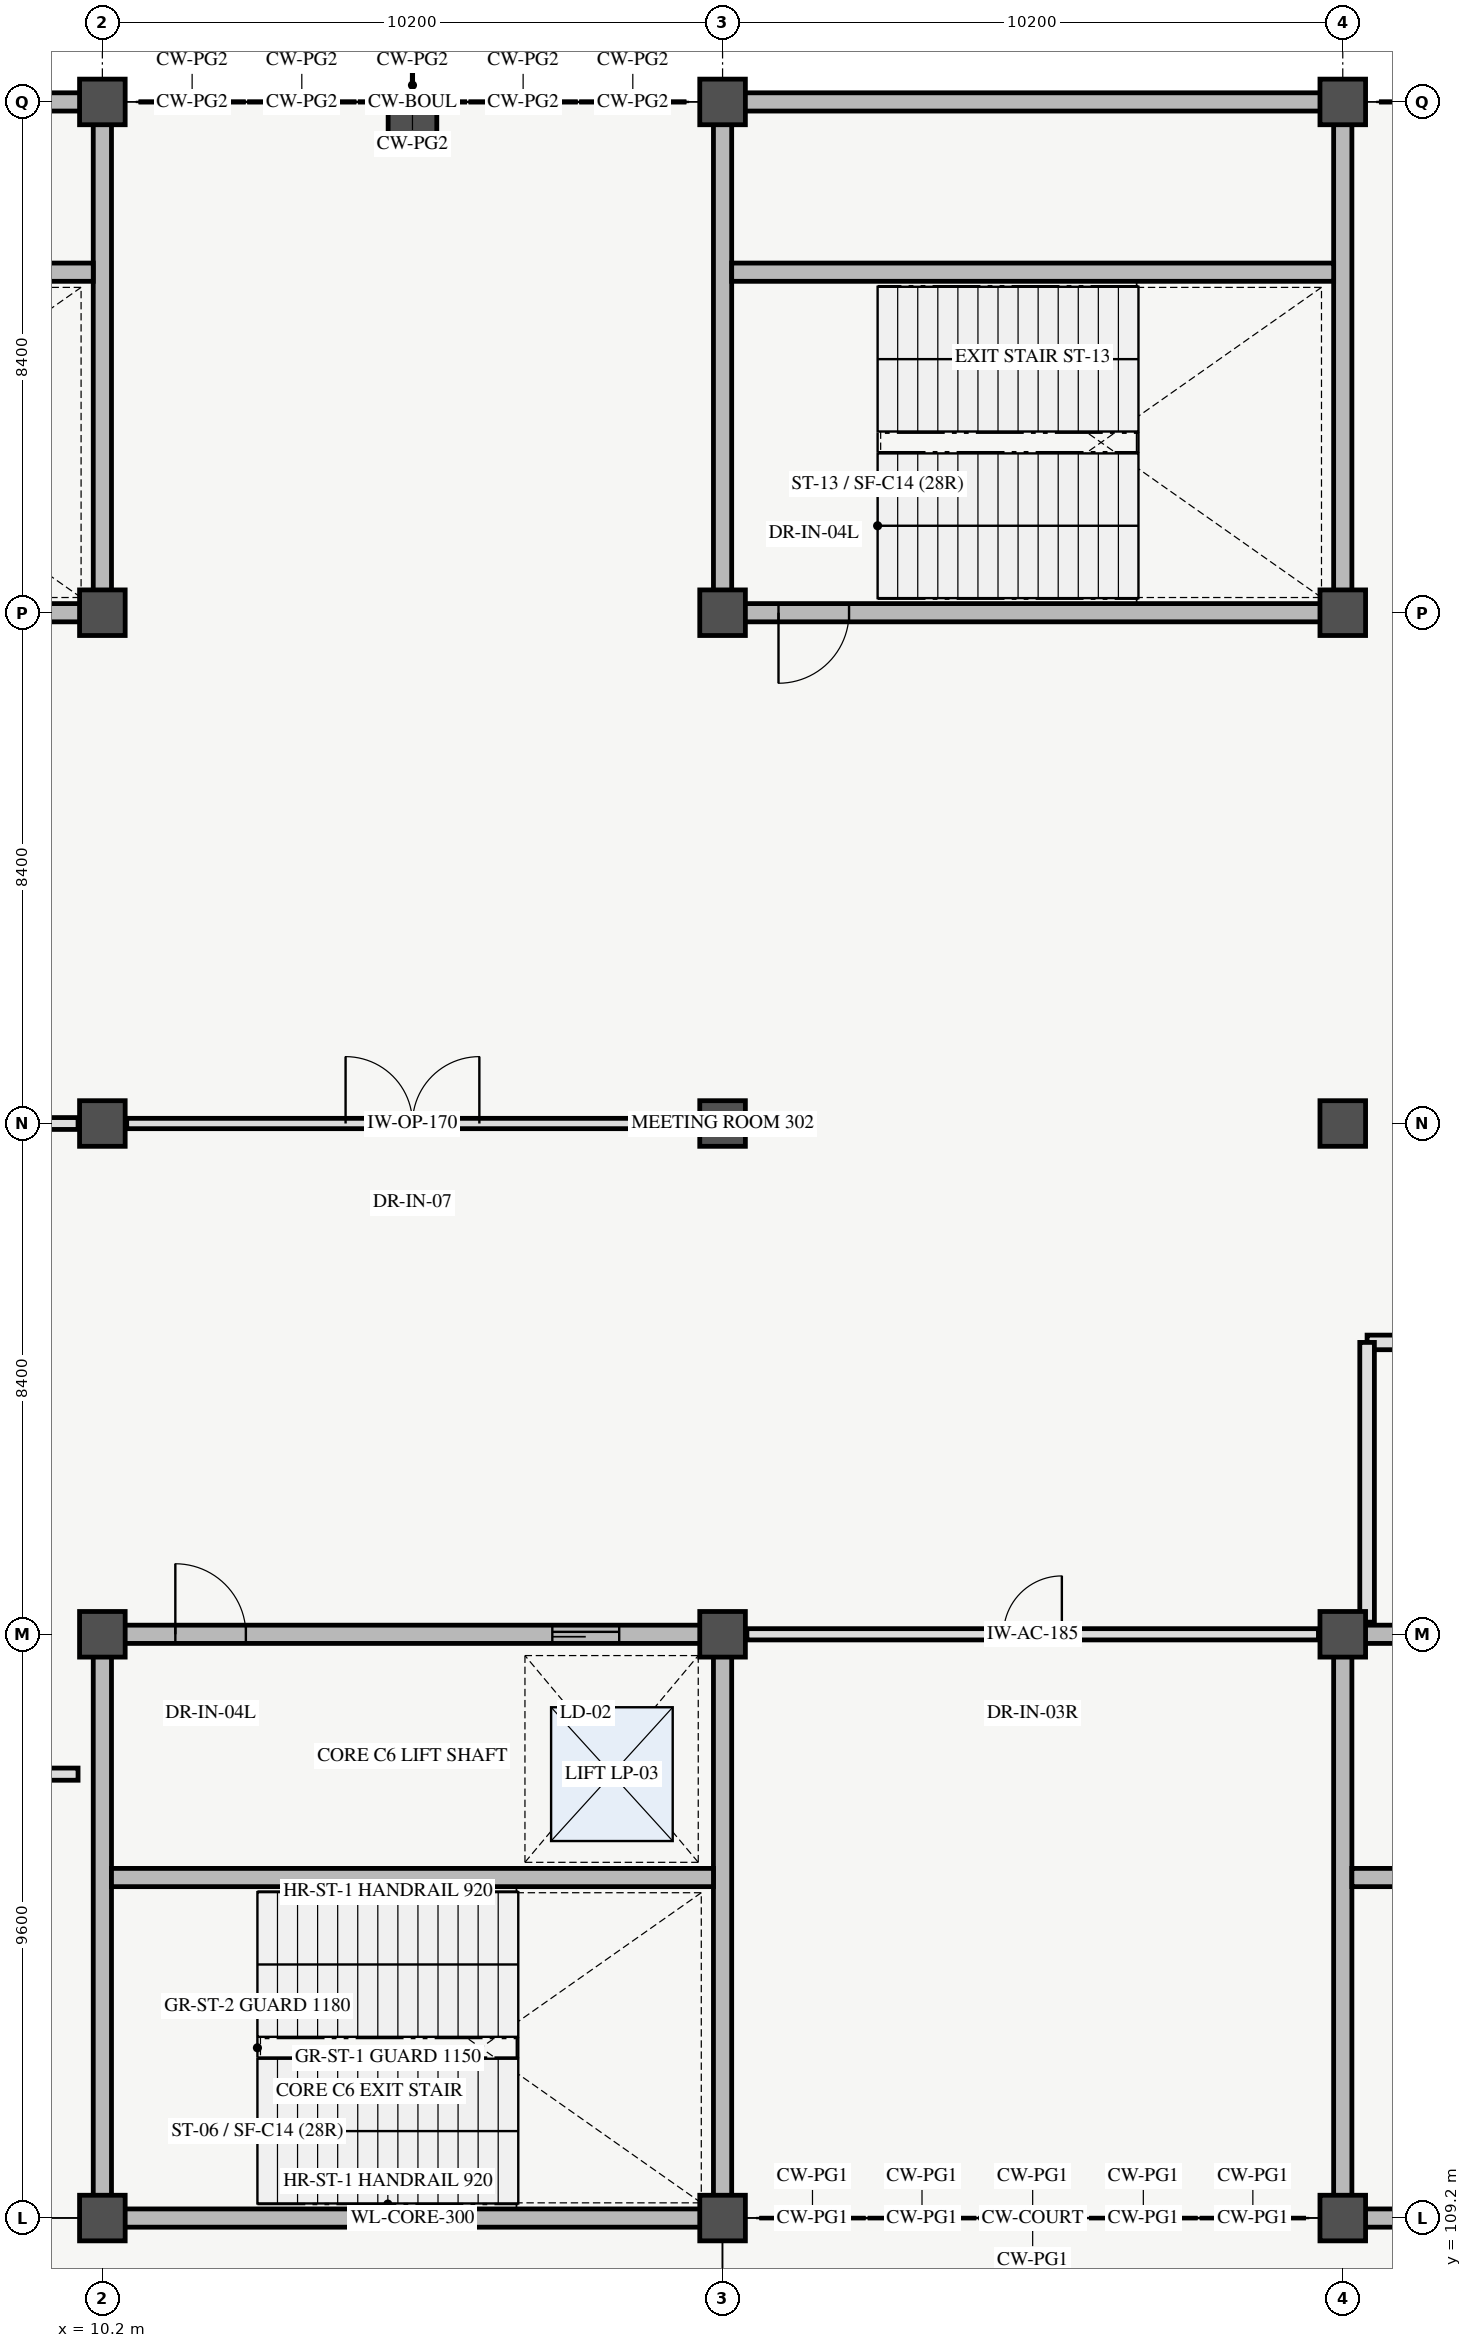
"""IFC4 building model, lengths in metres.
Left out: names, types, materials, properties, quantities, classifications, styles, units other than length and angle.
Written with IfcOpenShell. Run it as: python <this file> out.ifc"""

import sys

from ifc_helpers import new_model, si_unit, direction, frame, frame_2d, origin, origin_2d, place, context, subcontext, project, spatial, rectangle, extrude, element, fill, save


model = new_model("IFC4")
c1 = context("Model", 3, precision=1e-05, world=origin(), true_north=direction((0.0, 1.0)))
c2 = subcontext(c1, "Body", "Model", "MODEL_VIEW")
j1 = project(units=[si_unit("LENGTHUNIT", "METRE"), si_unit("PLANEANGLEUNIT", "RADIAN")], contexts=[c1])
p1 = place(None, origin())
s1 = spatial("IfcSite", under=j1, at=p1, CompositionType="ELEMENT")
p2 = place(p1, origin())
s2 = spatial("IfcBuilding", under=s1, at=p2, CompositionType="ELEMENT")
p3 = place(p2, frame((0.0, 0.0, 10.8)))
s3 = spatial("IfcBuildingStorey", under=s2, at=p3, CompositionType="ELEMENT", Elevation=10.8)
for number, where, z_axis, x_axis in (
    (1, (10.2, 109.2, 0.0), (0.0, 0.0, 1.0), (1.0, 0.0, 0.0)),
    (2, (10.2, 118.8, 0.0), (0.0, 0.0, 1.0), (1.0, 0.0, 0.0)),
    (3, (10.2, 127.2, 0.0), (0.0, 0.0, 1.0), (1.0, 0.0, 0.0)),
    (4, (10.2, 135.6, 0.0), (0.0, 0.0, 1.0), (1.0, 0.0, 0.0)),
    (5, (10.2, 144.0, 0.0), (0.0, 0.0, 1.0), (1.0, 0.0, 0.0)),
    (6, (20.4, 109.2, 0.0), (0.0, 0.0, 1.0), (1.0, 0.0, 0.0)),
    (7, (20.4, 118.8, 0.0), (0.0, 0.0, 1.0), (1.0, 0.0, 0.0)),
    (8, (20.4, 127.2, 0.0), (0.0, 0.0, 1.0), (1.0, 0.0, 0.0)),
    (9, (20.4, 135.6, 0.0), (0.0, 0.0, 1.0), (1.0, 0.0, 0.0)),
    (10, (20.4, 144.0, 0.0), (0.0, 0.0, 1.0), (1.0, 0.0, 0.0)),
    (11, (30.6, 109.2, 0.0), (0.0, 0.0, 1.0), (1.0, 0.0, 0.0)),
    (12, (30.6, 118.8, 0.0), (0.0, 0.0, 1.0), (1.0, 0.0, 0.0)),
    (13, (30.6, 127.2, 0.0), (0.0, 0.0, 1.0), (1.0, 0.0, 0.0)),
    (14, (30.6, 135.6, 0.0), (0.0, 0.0, 1.0), (1.0, 0.0, 0.0)),
    (15, (30.6, 144.0, 0.0), (0.0, 0.0, 1.0), (1.0, 0.0, 0.0)),
):
    element("IfcColumn", number, at=place(p3, frame(where, z_axis=z_axis, x_axis=x_axis)), inside=s3, PredefinedType="COLUMN", context=c2, shape_type="SweptSolid", body=[
        extrude(rectangle(XDim=0.75, YDim=0.75, at=origin_2d()), origin(), (0.0, 0.0, 1.0), 4.2),
    ])
p4 = place(p3, frame((15.3, 143.7, 0.0), z_axis=(0.0, 0.0, 1.0), x_axis=(1.0, 0.0, 0.0)))
e16 = element("IfcColumn", 16, at=p4, inside=s3, PredefinedType="PILASTER", context=c2, shape_type="SweptSolid", body=[
    extrude(rectangle(XDim=0.8, YDim=0.5, at=origin_2d()), origin(), (0.0, 0.0, 1.0), 4.2),
])
p5 = place(p3, frame((10.2, 109.2, 0.0), z_axis=(0.0, 0.0, 1.0), x_axis=(1.0, 0.0, 0.0)))
e17 = element("IfcWall", 17, at=p5, inside=s3, PredefinedType="SHEAR", context=c2, shape_type="SweptSolid", body=[
    extrude(rectangle(XDim=10.2, YDim=0.3, at=frame_2d((5.1, 0.0))), origin(), (0.0, 0.0, 1.0), 4.2),
])
p6 = place(p3, frame((10.2, 118.8, 0.0), z_axis=(0.0, 0.0, 1.0), x_axis=(1.0, 0.0, 0.0)))
e18 = element("IfcWall", 18, at=p6, inside=s3, PredefinedType="SHEAR", context=c2, shape_type="SweptSolid", body=[
    extrude(rectangle(XDim=10.2, YDim=0.3, at=frame_2d((5.1, 0.0))), origin(), (0.0, 0.0, 1.0), 4.2),
])
p7 = place(p6, frame((1.2, 0.0, 0.0)))
e19 = element("IfcOpeningElement", 19, at=p7, cuts=e18, PredefinedType="OPENING", context=c2, shape_type="SweptSolid", body=[
    extrude(rectangle(XDim=1.16, YDim=2.2, at=frame_2d((0.58, 1.1))), frame((0.0, 0.16, 0.0), z_axis=(0.0, -1.0, 0.0), x_axis=(1.0, 0.0, 0.0)), (0.0, 0.0, 1.0), 0.32),
])
p8 = place(p6, frame((7.4, 0.0, 0.0)))
e20 = element("IfcOpeningElement", 20, at=p8, cuts=e18, PredefinedType="OPENING", context=c2, shape_type="SweptSolid", body=[
    extrude(rectangle(XDim=1.1, YDim=2.2, at=frame_2d((0.55, 1.1))), frame((0.0, 0.16, 0.0), z_axis=(0.0, -1.0, 0.0), x_axis=(1.0, 0.0, 0.0)), (0.0, 0.0, 1.0), 0.32),
])
for number, where, z_axis, x_axis in (
    (21, (10.2, 109.2, 0.0), (0.0, 0.0, 1.0), (0.0, 1.0, 0.0)),
    (22, (20.4, 109.2, 0.0), (0.0, 0.0, 1.0), (0.0, 1.0, 0.0)),
):
    element("IfcWall", number, at=place(p3, frame(where, z_axis=z_axis, x_axis=x_axis)), inside=s3, PredefinedType="SHEAR", context=c2, shape_type="SweptSolid", body=[
        extrude(rectangle(XDim=9.6, YDim=0.3, at=frame_2d((4.8, 0.0))), origin(), (0.0, 0.0, 1.0), 4.2),
    ])
p9 = place(p3, frame((30.6, 109.2, 0.0), z_axis=(0.0, 0.0, 1.0), x_axis=(1.0, 0.0, 0.0)))
e23 = element("IfcWall", 23, at=p9, inside=s3, PredefinedType="SHEAR", context=c2, shape_type="SweptSolid", body=[
    extrude(rectangle(XDim=10.2, YDim=0.3, at=frame_2d((5.1, 0.0))), origin(), (0.0, 0.0, 1.0), 4.2),
])
p10 = place(p3, frame((30.6, 118.8, 0.0), z_axis=(0.0, 0.0, 1.0), x_axis=(1.0, 0.0, 0.0)))
e24 = element("IfcWall", 24, at=p10, inside=s3, PredefinedType="SHEAR", context=c2, shape_type="SweptSolid", body=[
    extrude(rectangle(XDim=10.2, YDim=0.3, at=frame_2d((5.1, 0.0))), origin(), (0.0, 0.0, 1.0), 4.2),
])
p11 = place(p10, frame((1.2, 0.0, 0.0)))
e25 = element("IfcOpeningElement", 25, at=p11, cuts=e24, PredefinedType="OPENING", context=c2, shape_type="SweptSolid", body=[
    extrude(rectangle(XDim=1.16, YDim=2.2, at=frame_2d((0.58, 1.1))), frame((0.0, 0.16, 0.0), z_axis=(0.0, -1.0, 0.0), x_axis=(1.0, 0.0, 0.0)), (0.0, 0.0, 1.0), 0.32),
])
p12 = place(p10, frame((7.4, 0.0, 0.0)))
e26 = element("IfcOpeningElement", 26, at=p12, cuts=e24, PredefinedType="OPENING", context=c2, shape_type="SweptSolid", body=[
    extrude(rectangle(XDim=1.2, YDim=2.25, at=frame_2d((0.6, 1.125))), frame((0.0, 0.16, 0.0), z_axis=(0.0, -1.0, 0.0), x_axis=(1.0, 0.0, 0.0)), (0.0, 0.0, 1.0), 0.32),
])
p13 = place(p3, frame((30.6, 109.2, 0.0), z_axis=(0.0, 0.0, 1.0), x_axis=(0.0, 1.0, 0.0)))
e27 = element("IfcWall", 27, at=p13, inside=s3, PredefinedType="SHEAR", context=c2, shape_type="SweptSolid", body=[
    extrude(rectangle(XDim=9.6, YDim=0.3, at=frame_2d((4.8, 0.0))), origin(), (0.0, 0.0, 1.0), 4.2),
])
for number, where, z_axis, x_axis in (
    (28, (10.35, 114.8, 0.0), (0.0, 0.0, 1.0), (1.0, 0.0, 0.0)),
    (29, (30.75, 114.8, 0.0), (0.0, 0.0, 1.0), (1.0, 0.0, 0.0)),
):
    element("IfcWall", number, at=place(p3, frame(where, z_axis=z_axis, x_axis=x_axis)), inside=s3, PredefinedType="SHEAR", context=c2, shape_type="SweptSolid", body=[
        extrude(rectangle(XDim=9.9, YDim=0.3, at=frame_2d((4.95, 0.0))), origin(), (0.0, 0.0, 1.0), 4.2),
    ])
p14 = place(p3, frame((20.4, 135.6, 0.0), z_axis=(0.0, 0.0, 1.0), x_axis=(1.0, 0.0, 0.0)))
e30 = element("IfcWall", 30, at=p14, inside=s3, PredefinedType="SHEAR", context=c2, shape_type="SweptSolid", body=[
    extrude(rectangle(XDim=10.2, YDim=0.3, at=frame_2d((5.1, 0.0))), origin(), (0.0, 0.0, 1.0), 4.2),
])
p15 = place(p14, frame((0.92, 0.0, 0.0)))
e31 = element("IfcOpeningElement", 31, at=p15, cuts=e30, PredefinedType="OPENING", context=c2, shape_type="SweptSolid", body=[
    extrude(rectangle(XDim=1.16, YDim=2.2, at=frame_2d((0.58, 1.1))), frame((0.0, 0.16, 0.0), z_axis=(0.0, -1.0, 0.0), x_axis=(1.0, 0.0, 0.0)), (0.0, 0.0, 1.0), 0.32),
])
p16 = place(p3, frame((20.4, 144.0, 0.0), z_axis=(0.0, 0.0, 1.0), x_axis=(1.0, 0.0, 0.0)))
e32 = element("IfcWall", 32, at=p16, inside=s3, PredefinedType="SHEAR", context=c2, shape_type="SweptSolid", body=[
    extrude(rectangle(XDim=10.2, YDim=0.3, at=frame_2d((5.1, 0.0))), origin(), (0.0, 0.0, 1.0), 4.2),
])
for number, where, z_axis, x_axis in (
    (33, (20.4, 135.6, 0.0), (0.0, 0.0, 1.0), (0.0, 1.0, 0.0)),
    (34, (30.6, 135.6, 0.0), (0.0, 0.0, 1.0), (0.0, 1.0, 0.0)),
):
    element("IfcWall", number, at=place(p3, frame(where, z_axis=z_axis, x_axis=x_axis)), inside=s3, PredefinedType="SHEAR", context=c2, shape_type="SweptSolid", body=[
        extrude(rectangle(XDim=8.4, YDim=0.3, at=frame_2d((4.2, 0.0))), origin(), (0.0, 0.0, 1.0), 4.2),
    ])
p17 = place(p3, frame((20.55, 141.2, 0.0), z_axis=(0.0, 0.0, 1.0), x_axis=(1.0, 0.0, 0.0)))
e35 = element("IfcWall", 35, at=p17, inside=s3, PredefinedType="SHEAR", context=c2, shape_type="SweptSolid", body=[
    extrude(rectangle(XDim=9.9, YDim=0.3, at=frame_2d((4.95, 0.0))), origin(), (0.0, 0.0, 1.0), 4.2),
])
p18 = place(p3, frame((0.0, 135.6, 0.0), z_axis=(0.0, 0.0, 1.0), x_axis=(1.0, 0.0, 0.0)))
e36 = element("IfcWall", 36, at=p18, inside=s3, PredefinedType="SHEAR", context=c2, shape_type="SweptSolid", body=[
    extrude(rectangle(XDim=10.2, YDim=0.3, at=frame_2d((5.1, 0.0))), origin(), (0.0, 0.0, 1.0), 4.2),
])
p19 = place(p18, frame((0.92, 0.0, 0.0)))
e37 = element("IfcOpeningElement", 37, at=p19, cuts=e36, PredefinedType="OPENING", context=c2, shape_type="SweptSolid", body=[
    extrude(rectangle(XDim=1.16, YDim=2.2, at=frame_2d((0.58, 1.1))), frame((0.0, 0.16, 0.0), z_axis=(0.0, -1.0, 0.0), x_axis=(1.0, 0.0, 0.0)), (0.0, 0.0, 1.0), 0.32),
])
p20 = place(p3, frame((0.0, 144.0, 0.0), z_axis=(0.0, 0.0, 1.0), x_axis=(1.0, 0.0, 0.0)))
e38 = element("IfcWall", 38, at=p20, inside=s3, PredefinedType="SHEAR", context=c2, shape_type="SweptSolid", body=[
    extrude(rectangle(XDim=10.2, YDim=0.3, at=frame_2d((5.1, 0.0))), origin(), (0.0, 0.0, 1.0), 4.2),
])
p21 = place(p3, frame((10.2, 135.6, 0.0), z_axis=(0.0, 0.0, 1.0), x_axis=(0.0, 1.0, 0.0)))
e39 = element("IfcWall", 39, at=p21, inside=s3, PredefinedType="SHEAR", context=c2, shape_type="SweptSolid", body=[
    extrude(rectangle(XDim=8.4, YDim=0.3, at=frame_2d((4.2, 0.0))), origin(), (0.0, 0.0, 1.0), 4.2),
])
p22 = place(p3, frame((0.15, 141.2, 0.0), z_axis=(0.0, 0.0, 1.0), x_axis=(1.0, 0.0, 0.0)))
e40 = element("IfcWall", 40, at=p22, inside=s3, PredefinedType="SHEAR", context=c2, shape_type="SweptSolid", body=[
    extrude(rectangle(XDim=9.9, YDim=0.3, at=frame_2d((4.95, 0.0))), origin(), (0.0, 0.0, 1.0), 4.2),
])
p23 = place(p3, frame((31.0, 123.6, 0.0), z_axis=(0.0, 0.0, 1.0), x_axis=(1.0, 0.0, 0.0)))
e41 = element("IfcWall", 41, at=p23, inside=s3, PredefinedType="PARTITIONING", context=c2, shape_type="SweptSolid", body=[
    extrude(rectangle(XDim=9.4, YDim=0.24, at=frame_2d((4.7, 0.0))), origin(), (0.0, 0.0, 1.0), 3.06),
])
p24 = place(p23, frame((3.75, 0.0, 0.0)))
e42 = element("IfcOpeningElement", 42, at=p24, cuts=e41, PredefinedType="OPENING", context=c2, shape_type="SweptSolid", body=[
    extrude(rectangle(XDim=1.9, YDim=2.25, at=frame_2d((0.95, 1.125))), frame((0.0, 0.13, 0.0), z_axis=(0.0, -1.0, 0.0), x_axis=(1.0, 0.0, 0.0)), (0.0, 0.0, 1.0), 0.26),
])
p25 = place(p3, frame((31.0, 119.0, 0.0), z_axis=(0.0, 0.0, 1.0), x_axis=(0.0, 1.0, 0.0)))
e43 = element("IfcWall", 43, at=p25, inside=s3, PredefinedType="PARTITIONING", context=c2, shape_type="SweptSolid", body=[
    extrude(rectangle(XDim=4.6, YDim=0.24, at=frame_2d((2.3, 0.0))), origin(), (0.0, 0.0, 1.0), 3.06),
])
p26 = place(p3, frame((0.4, 127.2, 0.0), z_axis=(0.0, 0.0, 1.0), x_axis=(1.0, 0.0, 0.0)))
e44 = element("IfcWall", 44, at=p26, inside=s3, PredefinedType="MOVABLE", context=c2, shape_type="SweptSolid", body=[
    extrude(rectangle(XDim=9.4, YDim=0.195, at=frame_2d((4.7, 0.0))), origin(), (0.0, 0.0, 1.0), 3.06),
])
p27 = place(p26, frame((3.85, 0.0, 0.0)))
e45 = element("IfcOpeningElement", 45, at=p27, cuts=e44, PredefinedType="OPENING", context=c2, shape_type="SweptSolid", body=[
    extrude(rectangle(XDim=1.7, YDim=2.3, at=frame_2d((0.85, 1.15))), frame((0.0, 0.107, 0.0), z_axis=(0.0, -1.0, 0.0), x_axis=(1.0, 0.0, 0.0)), (0.0, 0.0, 1.0), 0.215),
])
p28 = place(p3, frame((10.6, 127.2, 0.0), z_axis=(0.0, 0.0, 1.0), x_axis=(1.0, 0.0, 0.0)))
e46 = element("IfcWall", 46, at=p28, inside=s3, PredefinedType="MOVABLE", context=c2, shape_type="SweptSolid", body=[
    extrude(rectangle(XDim=9.4, YDim=0.17, at=frame_2d((4.7, 0.0))), origin(), (0.0, 0.0, 1.0), 3.06),
])
p29 = place(p28, frame((3.6, 0.0, 0.0)))
e47 = element("IfcOpeningElement", 47, at=p29, cuts=e46, PredefinedType="OPENING", context=c2, shape_type="SweptSolid", body=[
    extrude(rectangle(XDim=2.2, YDim=2.35, at=frame_2d((1.1, 1.175))), frame((0.0, 0.095, 0.0), z_axis=(0.0, -1.0, 0.0), x_axis=(1.0, 0.0, 0.0)), (0.0, 0.0, 1.0), 0.19),
])
p30 = place(p3, frame((0.4, 116.5, 0.0), z_axis=(0.0, 0.0, 1.0), x_axis=(1.0, 0.0, 0.0)))
e48 = element("IfcWall", 48, at=p30, inside=s3, PredefinedType="PARTITIONING", context=c2, shape_type="SweptSolid", body=[
    extrude(rectangle(XDim=9.4, YDim=0.2, at=frame_2d((4.7, 0.0))), origin(), (0.0, 0.0, 1.0), 3.06),
])
p31 = place(p30, frame((4.24, 0.0, 0.0)))
e49 = element("IfcOpeningElement", 49, at=p31, cuts=e48, PredefinedType="OPENING", context=c2, shape_type="SweptSolid", body=[
    extrude(rectangle(XDim=0.92, YDim=2.1, at=frame_2d((0.46, 1.05))), frame((0.0, 0.11, 0.0), z_axis=(0.0, -1.0, 0.0), x_axis=(1.0, 0.0, 0.0)), (0.0, 0.0, 1.0), 0.22),
])
p32 = place(p3, frame((20.8, 118.8, 0.0), z_axis=(0.0, 0.0, 1.0), x_axis=(1.0, 0.0, 0.0)))
e50 = element("IfcWall", 50, at=p32, inside=s3, PredefinedType="PARTITIONING", context=c2, shape_type="SweptSolid", body=[
    extrude(rectangle(XDim=9.4, YDim=0.185, at=frame_2d((4.7, 0.0))), origin(), (0.0, 0.0, 1.0), 3.06),
])
p33 = place(p32, frame((4.22, 0.0, 0.0)))
e51 = element("IfcOpeningElement", 51, at=p33, cuts=e50, PredefinedType="OPENING", context=c2, shape_type="SweptSolid", body=[
    extrude(rectangle(XDim=0.96, YDim=2.1, at=frame_2d((0.48, 1.05))), frame((0.0, 0.103, 0.0), z_axis=(0.0, -1.0, 0.0), x_axis=(1.0, 0.0, 0.0)), (0.0, 0.0, 1.0), 0.205),
])
p34 = place(p7, origin())
e52 = element("IfcDoor", 52, at=p34, inside=s3, OperationType="SINGLE_SWING_LEFT", PredefinedType="DOOR", context=c2, shape_type="SweptSolid", body=[
    extrude(rectangle(XDim=1.16, YDim=2.2, at=frame_2d((0.58, 1.1))), frame((0.0, 0.025, 0.0), z_axis=(0.0, -1.0, 0.0), x_axis=(1.0, 0.0, 0.0)), (0.0, 0.0, 1.0), 0.05),
])
fill(e19, e52)
p35 = place(p8, origin())
e53 = element("IfcDoor", 53, at=p35, inside=s3, OperationType="SLIDING_TO_RIGHT", PredefinedType="DOOR", context=c2, shape_type="SweptSolid", body=[
    extrude(rectangle(XDim=1.1, YDim=2.2, at=frame_2d((0.55, 1.1))), frame((0.0, 0.025, 0.0), z_axis=(0.0, -1.0, 0.0), x_axis=(1.0, 0.0, 0.0)), (0.0, 0.0, 1.0), 0.05),
])
fill(e20, e53)
p36 = place(p15, origin())
e54 = element("IfcDoor", 54, at=p36, inside=s3, OperationType="SINGLE_SWING_LEFT", PredefinedType="DOOR", context=c2, shape_type="SweptSolid", body=[
    extrude(rectangle(XDim=1.16, YDim=2.2, at=frame_2d((0.58, 1.1))), frame((0.0, 0.025, 0.0), z_axis=(0.0, -1.0, 0.0), x_axis=(1.0, 0.0, 0.0)), (0.0, 0.0, 1.0), 0.05),
])
fill(e31, e54)
p37 = place(p29, origin())
e55 = element("IfcDoor", 55, at=p37, inside=s3, OperationType="DOUBLE_DOOR_SINGLE_SWING", PredefinedType="DOOR", context=c2, shape_type="SweptSolid", body=[
    extrude(rectangle(XDim=2.2, YDim=2.35, at=frame_2d((1.1, 1.175))), frame((0.0, 0.025, 0.0), z_axis=(0.0, -1.0, 0.0), x_axis=(1.0, 0.0, 0.0)), (0.0, 0.0, 1.0), 0.05),
])
fill(e47, e55)
p38 = place(p33, origin())
e56 = element("IfcDoor", 56, at=p38, inside=s3, OperationType="SINGLE_SWING_RIGHT", PredefinedType="DOOR", context=c2, shape_type="SweptSolid", body=[
    extrude(rectangle(XDim=0.96, YDim=2.1, at=frame_2d((0.48, 1.05))), frame((0.0, 0.025, 0.0), z_axis=(0.0, -1.0, 0.0), x_axis=(1.0, 0.0, 0.0)), (0.0, 0.0, 1.0), 0.05),
])
fill(e51, e56)
save(model, sys.argv[1])
